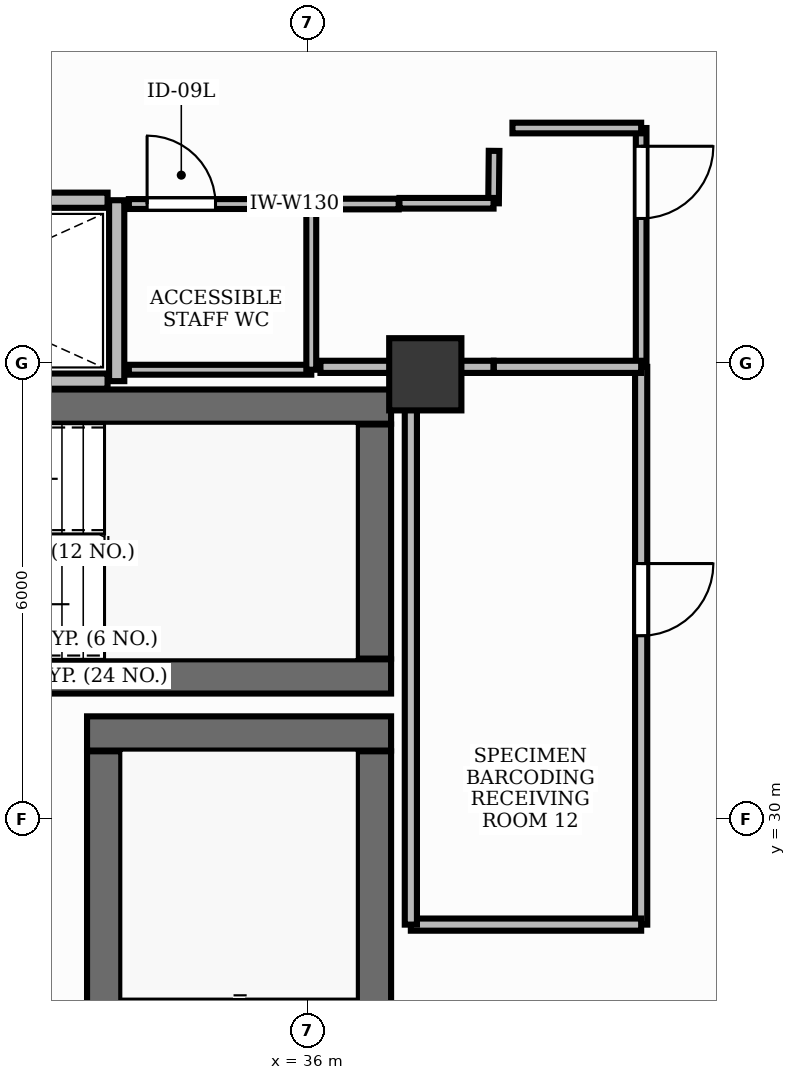
"""IFC4 building model, lengths in metres.
Left out: names, types, materials, properties, quantities, classifications, styles, units other than length and angle.
Written with IfcOpenShell. Run it as: python <this file> out.ifc"""

import sys

from ifc_helpers import new_model, si_unit, direction, frame, frame_2d, origin, origin_2d, place, context, subcontext, project, spatial, rectangle, extrude, element, fill, save


model = new_model("IFC4")
c1 = context("Model", 3, precision=1e-05, world=origin(), true_north=direction((0.0, 1.0)))
c2 = subcontext(c1, "Body", "Model", "MODEL_VIEW")
j1 = project(units=[si_unit("LENGTHUNIT", "METRE"), si_unit("PLANEANGLEUNIT", "RADIAN")], contexts=[c1])
p1 = place(None, origin())
s1 = spatial("IfcSite", under=j1, at=p1, CompositionType="ELEMENT")
p2 = place(p1, origin())
s2 = spatial("IfcBuilding", under=s1, at=p2, CompositionType="ELEMENT")
p3 = place(p2, frame((0.0, 0.0, 59.4)))
s3 = spatial("IfcBuildingStorey", under=s2, at=p3, CompositionType="ELEMENT", Elevation=59.4)
p4 = place(p3, frame((28.852, 35.425, 0.0), z_axis=(0.0, 0.0, 1.0), x_axis=(1.0, 0.0, 0.0)))
e1 = element("IfcWall", 1, at=p4, inside=s3, PredefinedType="SHEAR", context=c2, shape_type="SweptSolid", body=[
    extrude(rectangle(XDim=8.248, YDim=0.45, at=frame_2d((4.124, 0.0))), origin(), (0.0, 0.0, 1.0), 3.9),
])
p5 = place(p3, frame((28.35, 31.875, 0.0), z_axis=(0.0, 0.0, 1.0), x_axis=(1.0, 0.0, 0.0)))
e2 = element("IfcWall", 2, at=p5, inside=s3, PredefinedType="SHEAR", context=c2, shape_type="SweptSolid", body=[
    extrude(rectangle(XDim=8.75, YDim=0.45, at=frame_2d((4.375, 0.0))), origin(), (0.0, 0.0, 1.0), 3.9),
])
p6 = place(p3, frame((36.875, 32.11, 0.0), z_axis=(0.0, 0.0, 1.0), x_axis=(0.0, 1.0, 0.0)))
e3 = element("IfcWall", 3, at=p6, inside=s3, PredefinedType="SHEAR", context=c2, shape_type="SweptSolid", body=[
    extrude(rectangle(XDim=3.08, YDim=0.45, at=frame_2d((1.54, 0.0))), origin(), (0.0, 0.0, 1.0), 3.9),
])
p7 = place(p3, frame((33.1, 31.125, 0.0), z_axis=(0.0, 0.0, 1.0), x_axis=(1.0, 0.0, 0.0)))
e4 = element("IfcWall", 4, at=p7, inside=s3, PredefinedType="SHEAR", context=c2, shape_type="SweptSolid", body=[
    extrude(rectangle(XDim=4.0, YDim=0.45, at=frame_2d((2.0, 0.0))), origin(), (0.0, 0.0, 1.0), 3.9),
])
p8 = place(p3, frame((36.875, 23.11, 0.0), z_axis=(0.0, 0.0, 1.0), x_axis=(0.0, 1.0, 0.0)))
e5 = element("IfcWall", 5, at=p8, inside=s3, PredefinedType="SHEAR", context=c2, shape_type="SweptSolid", body=[
    extrude(rectangle(XDim=7.78, YDim=0.45, at=frame_2d((3.89, 0.0))), origin(), (0.0, 0.0, 1.0), 3.9),
])
p9 = place(p3, frame((33.325, 23.11, 0.0), z_axis=(0.0, 0.0, 1.0), x_axis=(0.0, 1.0, 0.0)))
e6 = element("IfcWall", 6, at=p9, inside=s3, PredefinedType="SHEAR", context=c2, shape_type="SweptSolid", body=[
    extrude(rectangle(XDim=7.78, YDim=0.45, at=frame_2d((3.89, 0.0))), origin(), (0.0, 0.0, 1.0), 3.9),
])
p10 = place(p9, frame((0.2, 0.0, 0.0)))
e7 = element("IfcOpeningElement", 7, at=p10, cuts=e6, PredefinedType="OPENING", context=c2, shape_type="SweptSolid", body=[
    extrude(rectangle(XDim=1.05, YDim=2.15, at=frame_2d((0.525, 1.075))), frame((0.0, 0.24, 0.0), z_axis=(0.0, -1.0, 0.0), x_axis=(1.0, 0.0, 0.0)), (0.0, 0.0, 1.0), 0.48),
])
p11 = place(p3, frame((37.55, 35.85, -0.0), z_axis=(0.0, 0.0, 1.0), x_axis=(1.0, 0.0, 0.0)))
e8 = element("IfcColumn", 8, at=p11, inside=s3, PredefinedType="PILASTER", context=c2, shape_type="SweptSolid", body=[
    extrude(rectangle(XDim=0.95, YDim=0.95, at=origin_2d()), origin(), (0.0, 0.0, 1.0), 3.901),
])
p12 = place(p3, frame((33.49, 35.76, 0.0), z_axis=(0.0, 0.0, 1.0), x_axis=(0.0, 1.0, 0.0)))
e9 = element("IfcWall", 9, at=p12, inside=s3, PredefinedType="PARTITIONING", context=c2, shape_type="SweptSolid", body=[
    extrude(rectangle(XDim=2.38, YDim=0.2, at=frame_2d((1.19, 0.0))), origin(), (0.0, 0.0, 1.0), 2.91),
])
for number, where, z_axis, x_axis in (
    (10, (28.8, 35.76, 0.0), (0.0, 0.0, 1.0), (1.0, 0.0, 0.0)),
    (11, (28.8, 38.14, 0.0), (0.0, 0.0, 1.0), (1.0, 0.0, 0.0)),
):
    element("IfcWall", number, at=place(p3, frame(where, z_axis=z_axis, x_axis=x_axis)), inside=s3, PredefinedType="PARTITIONING", context=c2, shape_type="SweptSolid", body=[
        extrude(rectangle(XDim=4.57, YDim=0.2, at=frame_2d((2.285, 0.0))), origin(), (0.0, 0.0, 1.0), 2.91),
    ])
p13 = place(p3, frame((33.65, 38.09, 0.0), z_axis=(0.0, 0.0, 1.0), x_axis=(1.0, 0.0, 0.0)))
e12 = element("IfcWall", 12, at=p13, inside=s3, PredefinedType="PARTITIONING", context=c2, shape_type="SweptSolid", body=[
    extrude(rectangle(XDim=2.4, YDim=0.13, at=frame_2d((1.2, 0.0))), origin(), (0.0, 0.0, 1.0), 2.91),
])
p14 = place(p13, frame((0.24, 0.0, 0.0)))
e13 = element("IfcOpeningElement", 13, at=p14, cuts=e12, PredefinedType="OPENING", context=c2, shape_type="SweptSolid", body=[
    extrude(rectangle(XDim=0.9, YDim=2.15, at=frame_2d((0.45, 1.075))), frame((0.0, 0.08, 0.0), z_axis=(0.0, -1.0, 0.0), x_axis=(1.0, 0.0, 0.0)), (0.0, 0.0, 1.0), 0.16),
])
p15 = place(p3, frame((40.39, 35.948, 0.0), z_axis=(0.0, 0.0, 1.0), x_axis=(0.0, -1.0, 0.0)))
e14 = element("IfcWall", 14, at=p15, inside=s3, PredefinedType="PARTITIONING", context=c2, shape_type="SweptSolid", body=[
    extrude(rectangle(XDim=7.338, YDim=0.16, at=frame_2d((3.669, 0.0))), origin(), (0.0, 0.0, 1.0), 2.91),
])
p16 = place(p15, frame((2.588, 0.0, 0.0)))
e15 = element("IfcOpeningElement", 15, at=p16, cuts=e14, PredefinedType="OPENING", context=c2, shape_type="SweptSolid", body=[
    extrude(rectangle(XDim=0.95, YDim=2.15, at=frame_2d((0.475, 1.075))), frame((0.0, 0.095, 0.0), z_axis=(0.0, -1.0, 0.0), x_axis=(1.0, 0.0, 0.0)), (0.0, 0.0, 1.0), 0.19),
])
p17 = place(p3, frame((40.39, 39.09, 0.0), z_axis=(0.0, 0.0, 1.0), x_axis=(0.0, -1.0, 0.0)))
e16 = element("IfcWall", 16, at=p17, inside=s3, PredefinedType="PARTITIONING", context=c2, shape_type="SweptSolid", body=[
    extrude(rectangle(XDim=3.132, YDim=0.14, at=frame_2d((1.566, 0.0))), origin(), (0.0, 0.0, 1.0), 2.91),
])
p18 = place(p17, frame((0.24, 0.0, 0.0)))
e17 = element("IfcOpeningElement", 17, at=p18, cuts=e16, PredefinedType="OPENING", context=c2, shape_type="SweptSolid", body=[
    extrude(rectangle(XDim=0.95, YDim=2.15, at=frame_2d((0.475, 1.075))), frame((0.0, 0.085, 0.0), z_axis=(0.0, -1.0, 0.0), x_axis=(1.0, 0.0, 0.0)), (0.0, 0.0, 1.0), 0.17),
])
p19 = place(p3, frame((36.05, 35.91, 0.0), z_axis=(0.0, 0.0, 1.0), x_axis=(-1.0, 0.0, 0.0)))
e18 = element("IfcWall", 18, at=p19, inside=s3, PredefinedType="PARTITIONING", context=c2, shape_type="SweptSolid", body=[
    extrude(rectangle(XDim=2.4, YDim=0.13, at=frame_2d((1.2, 0.0))), origin(), (0.0, 0.0, 1.0), 2.91),
])
p20 = place(p3, frame((36.05, 38.09, 0.0), z_axis=(0.0, 0.0, 1.0), x_axis=(0.0, -1.0, 0.0)))
e19 = element("IfcWall", 19, at=p20, inside=s3, PredefinedType="PARTITIONING", context=c2, shape_type="SweptSolid", body=[
    extrude(rectangle(XDim=2.18, YDim=0.13, at=frame_2d((1.09, 0.0))), origin(), (0.0, 0.0, 1.0), 2.91),
])
p21 = place(p3, frame((36.171, 35.948, 0.0), z_axis=(0.0, 0.0, 1.0), x_axis=(1.0, 0.0, 0.0)))
e20 = element("IfcWall", 20, at=p21, inside=s3, PredefinedType="PARTITIONING", context=c2, shape_type="SweptSolid", body=[
    extrude(rectangle(XDim=2.277, YDim=0.16, at=frame_2d((1.139, 0.0))), origin(), (0.0, 0.0, 1.0), 2.91),
])
p22 = place(p3, frame((38.452, 35.948, 0.0), z_axis=(0.0, 0.0, 1.0), x_axis=(1.0, 0.0, 0.0)))
e21 = element("IfcWall", 21, at=p22, inside=s3, PredefinedType="PARTITIONING", context=c2, shape_type="SweptSolid", body=[
    extrude(rectangle(XDim=1.938, YDim=0.16, at=frame_2d((0.969, 0.0))), origin(), (0.0, 0.0, 1.0), 2.91),
])
p23 = place(p3, frame((40.39, 28.61, 0.0), z_axis=(0.0, 0.0, 1.0), x_axis=(-1.0, 0.0, 0.0)))
e22 = element("IfcWall", 22, at=p23, inside=s3, PredefinedType="PARTITIONING", context=c2, shape_type="SweptSolid", body=[
    extrude(rectangle(XDim=3.03, YDim=0.16, at=frame_2d((1.515, 0.0))), origin(), (0.0, 0.0, 1.0), 2.91),
])
p24 = place(p3, frame((37.36, 28.61, 0.0), z_axis=(0.0, 0.0, 1.0), x_axis=(0.0, 1.0, 0.0)))
e23 = element("IfcWall", 23, at=p24, inside=s3, PredefinedType="PARTITIONING", context=c2, shape_type="SweptSolid", body=[
    extrude(rectangle(XDim=7.29, YDim=0.16, at=frame_2d((3.645, 0.0))), origin(), (0.0, 0.0, 1.0), 2.91),
])
p25 = place(p3, frame((38.455, 38.789, 0.0), z_axis=(0.0, 0.0, 1.0), x_axis=(-0.010272217479, -0.999947239382, 0.0)))
e24 = element("IfcWall", 24, at=p25, inside=s3, PredefinedType="PARTITIONING", context=c2, shape_type="SweptSolid", body=[
    extrude(rectangle(XDim=0.689, YDim=0.14, at=frame_2d((0.345, 0.0))), origin(), (0.0, 0.0, 1.0), 2.91),
])
p26 = place(p3, frame((38.697, 39.09, 0.0), z_axis=(0.0, 0.0, 1.0), x_axis=(1.0, 0.0, 0.0)))
e25 = element("IfcWall", 25, at=p26, inside=s3, PredefinedType="PARTITIONING", context=c2, shape_type="SweptSolid", body=[
    extrude(rectangle(XDim=1.693, YDim=0.14, at=frame_2d((0.847, 0.0))), origin(), (0.0, 0.0, 1.0), 2.91),
])
p27 = place(p3, frame((36.06, 38.09, 0.0), z_axis=(0.0, 0.0, 1.0), x_axis=(1.0, 0.0, 0.0)))
e26 = element("IfcWall", 26, at=p27, inside=s3, PredefinedType="PARTITIONING", context=c2, shape_type="SweptSolid", body=[
    extrude(rectangle(XDim=1.14, YDim=0.14, at=frame_2d((0.57, 0.0))), origin(), (0.0, 0.0, 1.0), 2.91),
])
p28 = place(p3, frame((37.21, 38.1, 0.0), z_axis=(0.0, 0.0, 1.0), x_axis=(1.0, 0.0, 0.0)))
e27 = element("IfcWall", 27, at=p28, inside=s3, PredefinedType="PARTITIONING", context=c2, shape_type="SweptSolid", body=[
    extrude(rectangle(XDim=1.238, YDim=0.14, at=frame_2d((0.619, 0.0))), origin(), (0.0, 0.0, 1.0), 2.91),
])
p29 = place(p14, origin())
e28 = element("IfcDoor", 28, at=p29, inside=s3, OperationType="SINGLE_SWING_LEFT", PredefinedType="DOOR", context=c2, shape_type="SweptSolid", body=[
    extrude(rectangle(XDim=0.9, YDim=2.15, at=frame_2d((0.45, 1.075))), frame((0.0, 0.025, 0.0), z_axis=(0.0, -1.0, 0.0), x_axis=(1.0, 0.0, 0.0)), (0.0, 0.0, 1.0), 0.05),
])
fill(e13, e28)
p30 = place(p16, origin())
e29 = element("IfcDoor", 29, at=p30, inside=s3, OperationType="SINGLE_SWING_LEFT", PredefinedType="DOOR", context=c2, shape_type="SweptSolid", body=[
    extrude(rectangle(XDim=0.95, YDim=2.15, at=frame_2d((0.475, 1.075))), frame((0.0, 0.025, 0.0), z_axis=(0.0, -1.0, 0.0), x_axis=(1.0, 0.0, 0.0)), (0.0, 0.0, 1.0), 0.05),
])
fill(e15, e29)
p31 = place(p18, origin())
e30 = element("IfcDoor", 30, at=p31, inside=s3, OperationType="SINGLE_SWING_LEFT", PredefinedType="DOOR", context=c2, shape_type="SweptSolid", body=[
    extrude(rectangle(XDim=0.95, YDim=2.15, at=frame_2d((0.475, 1.075))), frame((0.0, 0.025, 0.0), z_axis=(0.0, -1.0, 0.0), x_axis=(1.0, 0.0, 0.0)), (0.0, 0.0, 1.0), 0.05),
])
fill(e17, e30)
save(model, sys.argv[1])
